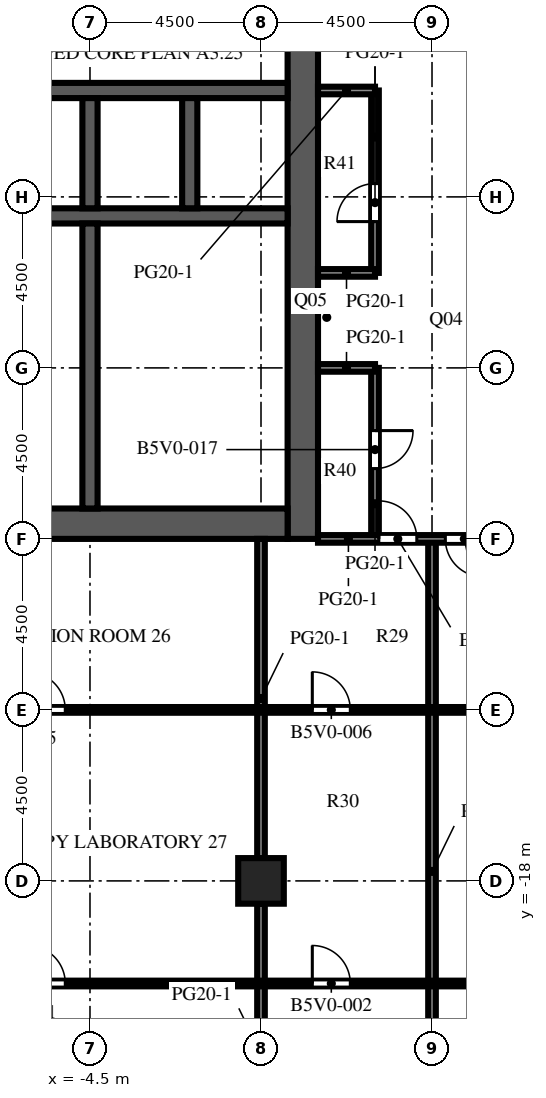
"""IFC4 building model, lengths in metres.
Left out: names, types, materials, properties, quantities, classifications, styles, units other than length and angle.
Written with IfcOpenShell. Run it as: python <this file> out.ifc"""

import sys

from ifc_helpers import new_model, si_unit, direction, frame, frame_2d, origin, origin_2d, place, context, subcontext, project, spatial, rectangle, extrude, element, fill, save


model = new_model("IFC4")
c1 = context("Model", 3, precision=1e-05, world=origin(), true_north=direction((0.0, 1.0)))
c2 = subcontext(c1, "Body", "Model", "MODEL_VIEW")
j1 = project(units=[si_unit("LENGTHUNIT", "METRE"), si_unit("PLANEANGLEUNIT", "RADIAN")], contexts=[c1])
p1 = place(None, origin())
s1 = spatial("IfcSite", under=j1, at=p1, CompositionType="ELEMENT")
p2 = place(p1, origin())
s2 = spatial("IfcBuilding", under=s1, at=p2, CompositionType="ELEMENT")
p3 = place(p2, frame((0.0, 0.0, 160.9)))
s3 = spatial("IfcBuildingStorey", under=s2, at=p3, CompositionType="ELEMENT", Elevation=160.9)
p4 = place(p3, frame((0.0, -18.0, 0.0), z_axis=(0.0, 0.0, 1.0), x_axis=(1.0, 0.0, 0.0)))
e1 = element("IfcColumn", 1, at=p4, inside=s3, PredefinedType="COLUMN", context=c2, shape_type="SweptSolid", body=[
    extrude(rectangle(XDim=1.2, YDim=1.2, at=origin_2d()), origin(), (0.0, 0.0, 1.0), 4.1),
])
p5 = place(p3, frame((1.1, -9.0, 0.0), z_axis=(0.0, 0.0, 1.0), x_axis=(0.0, 1.0, 0.0)))
e2 = element("IfcWall", 2, at=p5, inside=s3, PredefinedType="SHEAR", context=c2, shape_type="SweptSolid", body=[
    extrude(rectangle(XDim=27.5, YDim=0.8, at=frame_2d((13.75, 0.0))), origin(), (0.0, 0.0, 1.0), 4.1),
])
p6 = place(p5, frame((12.55, 0.0, 0.0)))
e3 = element("IfcOpeningElement", 3, at=p6, cuts=e2, PredefinedType="OPENING", context=c2, shape_type="SweptSolid", body=[
    extrude(rectangle(XDim=2.4, YDim=2.4, at=frame_2d((1.2, 1.2))), frame((0.0, 0.41, 0.0), z_axis=(0.0, -1.0, 0.0), x_axis=(1.0, 0.0, 0.0)), (0.0, 0.0, 1.0), 0.82),
])
p7 = place(p5, frame((5.45, 0.0, 0.0)))
e4 = element("IfcOpeningElement", 4, at=p7, cuts=e2, PredefinedType="OPENING", context=c2, shape_type="SweptSolid", body=[
    extrude(rectangle(XDim=1.2, YDim=2.1, at=frame_2d((0.6, 1.05))), frame((0.0, 0.41, 0.0), z_axis=(0.0, -1.0, 0.0), x_axis=(1.0, 0.0, 0.0)), (0.0, 0.0, 1.0), 0.82),
])
p8 = place(p5, frame((19.45, 0.0, 0.0)))
e5 = element("IfcOpeningElement", 5, at=p8, cuts=e2, PredefinedType="OPENING", context=c2, shape_type="SweptSolid", body=[
    extrude(rectangle(XDim=1.0, YDim=2.1, at=frame_2d((0.5, 1.05))), frame((0.0, 0.41, 0.0), z_axis=(0.0, -1.0, 0.0), x_axis=(1.0, 0.0, 0.0)), (0.0, 0.0, 1.0), 0.82),
])
p9 = place(p5, frame((21.137, 0.0, 0.0)))
e6 = element("IfcOpeningElement", 6, at=p9, cuts=e2, PredefinedType="OPENING", context=c2, shape_type="SweptSolid", body=[
    extrude(rectangle(XDim=1.0, YDim=2.1, at=frame_2d((0.5, 1.05))), frame((0.0, 0.41, 0.0), z_axis=(0.0, -1.0, 0.0), x_axis=(1.0, 0.0, 0.0)), (0.0, 0.0, 1.0), 0.82),
])
p10 = place(p5, frame((23.2, 0.0, 0.0)))
e7 = element("IfcOpeningElement", 7, at=p10, cuts=e2, PredefinedType="OPENING", context=c2, shape_type="SweptSolid", body=[
    extrude(rectangle(XDim=1.0, YDim=2.1, at=frame_2d((0.5, 1.05))), frame((0.0, 0.41, 0.0), z_axis=(0.0, -1.0, 0.0), x_axis=(1.0, 0.0, 0.0)), (0.0, 0.0, 1.0), 0.82),
])
p11 = place(p5, frame((25.262, 0.0, 0.0)))
e8 = element("IfcOpeningElement", 8, at=p11, cuts=e2, PredefinedType="OPENING", context=c2, shape_type="SweptSolid", body=[
    extrude(rectangle(XDim=1.0, YDim=2.1, at=frame_2d((0.5, 1.05))), frame((0.0, 0.41, 0.0), z_axis=(0.0, -1.0, 0.0), x_axis=(1.0, 0.0, 0.0)), (0.0, 0.0, 1.0), 0.82),
])
p12 = place(p3, frame((-9.7, -8.6, 0.0), z_axis=(0.0, 0.0, 1.0), x_axis=(1.0, 0.0, 0.0)))
e9 = element("IfcWall", 9, at=p12, inside=s3, PredefinedType="SHEAR", context=c2, shape_type="SweptSolid", body=[
    extrude(rectangle(XDim=10.4, YDim=0.8, at=frame_2d((5.2, 0.0))), origin(), (0.0, 0.0, 1.0), 4.1),
])
p13 = place(p3, frame((-9.7, -0.5, 0.0), z_axis=(0.0, 0.0, 1.0), x_axis=(1.0, 0.0, 0.0)))
e10 = element("IfcWall", 10, at=p13, inside=s3, PredefinedType="SHEAR", context=c2, shape_type="SweptSolid", body=[
    extrude(rectangle(XDim=10.4, YDim=0.4, at=frame_2d((5.2, 0.0))), origin(), (0.0, 0.0, 1.0), 4.1),
])
p14 = place(p3, frame((-9.7, 2.8, 0.0), z_axis=(0.0, 0.0, 1.0), x_axis=(1.0, 0.0, 0.0)))
e11 = element("IfcWall", 11, at=p14, inside=s3, PredefinedType="SHEAR", context=c2, shape_type="SweptSolid", body=[
    extrude(rectangle(XDim=10.4, YDim=0.4, at=frame_2d((5.2, 0.0))), origin(), (0.0, 0.0, 1.0), 4.1),
])
p15 = place(p14, frame((0.738, 0.0, 0.0)))
e12 = element("IfcOpeningElement", 12, at=p15, cuts=e11, PredefinedType="OPENING", context=c2, shape_type="SweptSolid", body=[
    extrude(rectangle(XDim=1.1, YDim=2.1, at=frame_2d((0.55, 1.05))), frame((0.0, 0.21, 0.0), z_axis=(0.0, -1.0, 0.0), x_axis=(1.0, 0.0, 0.0)), (0.0, 0.0, 1.0), 0.42),
])
p16 = place(p14, frame((3.337, 0.0, 0.0)))
e13 = element("IfcOpeningElement", 13, at=p16, cuts=e11, PredefinedType="OPENING", context=c2, shape_type="SweptSolid", body=[
    extrude(rectangle(XDim=1.1, YDim=2.1, at=frame_2d((0.55, 1.05))), frame((0.0, 0.21, 0.0), z_axis=(0.0, -1.0, 0.0), x_axis=(1.0, 0.0, 0.0)), (0.0, 0.0, 1.0), 0.42),
])
p17 = place(p14, frame((6.012, 0.0, 0.0)))
e14 = element("IfcOpeningElement", 14, at=p17, cuts=e11, PredefinedType="OPENING", context=c2, shape_type="SweptSolid", body=[
    extrude(rectangle(XDim=1.0, YDim=2.1, at=frame_2d((0.5, 1.05))), frame((0.0, 0.21, 0.0), z_axis=(0.0, -1.0, 0.0), x_axis=(1.0, 0.0, 0.0)), (0.0, 0.0, 1.0), 0.42),
])
p18 = place(p14, frame((8.613, 0.0, 0.0)))
e15 = element("IfcOpeningElement", 15, at=p18, cuts=e11, PredefinedType="OPENING", context=c2, shape_type="SweptSolid", body=[
    extrude(rectangle(XDim=1.0, YDim=2.1, at=frame_2d((0.5, 1.05))), frame((0.0, 0.21, 0.0), z_axis=(0.0, -1.0, 0.0), x_axis=(1.0, 0.0, 0.0)), (0.0, 0.0, 1.0), 0.42),
])
for number, where, z_axis, x_axis in (
    (16, (-4.5, -0.3, 0.0), (0.0, 0.0, 1.0), (0.0, 1.0, 0.0)),
    (17, (-1.875, -0.3, 0.0), (0.0, 0.0, 1.0), (0.0, 1.0, 0.0)),
):
    element("IfcWall", number, at=place(p3, frame(where, z_axis=z_axis, x_axis=x_axis)), inside=s3, PredefinedType="SHEAR", context=c2, shape_type="SweptSolid", body=[
        extrude(rectangle(XDim=2.9, YDim=0.4, at=frame_2d((1.45, 0.0))), origin(), (0.0, 0.0, 1.0), 4.1),
    ])
p19 = place(p3, frame((-4.5, -8.2, 0.0), z_axis=(0.0, 0.0, 1.0), x_axis=(0.0, 1.0, 0.0)))
e18 = element("IfcWall", 18, at=p19, inside=s3, PredefinedType="SHEAR", context=c2, shape_type="SweptSolid", body=[
    extrude(rectangle(XDim=7.5, YDim=0.4, at=frame_2d((3.75, 0.0))), origin(), (0.0, 0.0, 1.0), 4.1),
])
p20 = place(p3, frame((-0.8, -5.2, 0.0), z_axis=(0.0, 0.0, 1.0), x_axis=(1.0, 0.0, 0.0)))
e19 = element("IfcWall", 19, at=p20, inside=s3, PredefinedType="PARTITIONING", context=c2, shape_type="SweptSolid", body=[
    extrude(rectangle(XDim=1.5, YDim=0.1, at=frame_2d((0.75, 0.0))), origin(), (0.0, 0.0, 1.0), 3.65),
])
p21 = place(p20, frame((0.25, 0.0, 0.0)))
e20 = element("IfcOpeningElement", 20, at=p21, cuts=e19, PredefinedType="OPENING", context=c2, shape_type="SweptSolid", body=[
    extrude(rectangle(XDim=1.0, YDim=2.1, at=frame_2d((0.5, 1.05))), frame((0.0, 0.06, 0.0), z_axis=(0.0, -1.0, 0.0), x_axis=(1.0, 0.0, 0.0)), (0.0, 0.0, 1.0), 0.12),
])
p22 = place(p3, frame((-0.8, -5.2, 0.0), z_axis=(0.0, 0.0, 1.0), x_axis=(0.0, 1.0, 0.0)))
e21 = element("IfcWall", 21, at=p22, inside=s3, PredefinedType="PARTITIONING", context=c2, shape_type="SweptSolid", body=[
    extrude(rectangle(XDim=2.25, YDim=0.1, at=frame_2d((1.125, 0.0))), origin(), (0.0, 0.0, 1.0), 3.65),
])
p23 = place(p22, frame((0.625, 0.0, 0.0)))
e22 = element("IfcOpeningElement", 22, at=p23, cuts=e21, PredefinedType="OPENING", context=c2, shape_type="SweptSolid", body=[
    extrude(rectangle(XDim=1.0, YDim=2.1, at=frame_2d((0.5, 1.05))), frame((0.0, 0.06, 0.0), z_axis=(0.0, -1.0, 0.0), x_axis=(1.0, 0.0, 0.0)), (0.0, 0.0, 1.0), 0.12),
])
p24 = place(p3, frame((-0.8, -2.95, 0.0), z_axis=(0.0, 0.0, 1.0), x_axis=(0.0, 1.0, 0.0)))
e23 = element("IfcWall", 23, at=p24, inside=s3, PredefinedType="PARTITIONING", context=c2, shape_type="SweptSolid", body=[
    extrude(rectangle(XDim=2.25, YDim=0.1, at=frame_2d((1.125, 0.0))), origin(), (0.0, 0.0, 1.0), 3.65),
])
p25 = place(p24, frame((0.625, 0.0, 0.0)))
e24 = element("IfcOpeningElement", 24, at=p25, cuts=e23, PredefinedType="OPENING", context=c2, shape_type="SweptSolid", body=[
    extrude(rectangle(XDim=1.0, YDim=2.1, at=frame_2d((0.5, 1.05))), frame((0.0, 0.06, 0.0), z_axis=(0.0, -1.0, 0.0), x_axis=(1.0, 0.0, 0.0)), (0.0, 0.0, 1.0), 0.12),
])
for number, where, z_axis, x_axis in (
    (25, (-4.3, -5.2, 0.0), (0.0, 0.0, 1.0), (1.0, 0.0, 0.0)),
    (26, (-4.3, -2.95, 0.0), (0.0, 0.0, 1.0), (1.0, 0.0, 0.0)),
):
    element("IfcWall", number, at=place(p3, frame(where, z_axis=z_axis, x_axis=x_axis)), inside=s3, PredefinedType="PARTITIONING", context=c2, shape_type="SweptSolid", body=[
        extrude(rectangle(XDim=3.5, YDim=0.1, at=frame_2d((1.75, 0.0))), origin(), (0.0, 0.0, 1.0), 3.65),
    ])
p26 = place(p3, frame((0.0, -26.5, 0.0), z_axis=(0.0, 0.0, 1.0), x_axis=(0.0, 1.0, 0.0)))
e27 = element("IfcWall", 27, at=p26, inside=s3, PredefinedType="PARTITIONING", context=c2, shape_type="SweptSolid", body=[
    extrude(rectangle(XDim=7.9, YDim=0.2, at=frame_2d((3.95, 0.0))), origin(), (0.0, 0.0, 1.0), 3.65),
])
p27 = place(p3, frame((0.0, -17.4, 0.0), z_axis=(0.0, 0.0, 1.0), x_axis=(0.0, 1.0, 0.0)))
e28 = element("IfcWall", 28, at=p27, inside=s3, PredefinedType="PARTITIONING", context=c2, shape_type="SweptSolid", body=[
    extrude(rectangle(XDim=8.4, YDim=0.2, at=frame_2d((4.2, 0.0))), origin(), (0.0, 0.0, 1.0), 3.65),
])
p28 = place(p3, frame((3.0, -9.0, 0.0), z_axis=(0.0, 0.0, 1.0), x_axis=(0.0, 1.0, 0.0)))
e29 = element("IfcWall", 29, at=p28, inside=s3, PredefinedType="PARTITIONING", context=c2, shape_type="SweptSolid", body=[
    extrude(rectangle(XDim=4.5, YDim=0.2, at=frame_2d((2.25, 0.0))), origin(), (0.0, 0.0, 1.0), 3.65),
])
p29 = place(p28, frame((1.85, 0.0, 0.0)))
e30 = element("IfcOpeningElement", 30, at=p29, cuts=e29, PredefinedType="OPENING", context=c2, shape_type="SweptSolid", body=[
    extrude(rectangle(XDim=1.0, YDim=2.1, at=frame_2d((0.5, 1.05))), frame((0.0, 0.11, 0.0), z_axis=(0.0, -1.0, 0.0), x_axis=(1.0, 0.0, 0.0)), (0.0, 0.0, 1.0), 0.22),
])
p30 = place(p3, frame((3.0, -2.0, 0.0), z_axis=(0.0, 0.0, 1.0), x_axis=(0.0, 1.0, 0.0)))
e31 = element("IfcWall", 31, at=p30, inside=s3, PredefinedType="PARTITIONING", context=c2, shape_type="SweptSolid", body=[
    extrude(rectangle(XDim=4.8, YDim=0.2, at=frame_2d((2.4, 0.0))), origin(), (0.0, 0.0, 1.0), 3.65),
])
p31 = place(p30, frame((1.35, 0.0, 0.0)))
e32 = element("IfcOpeningElement", 32, at=p31, cuts=e31, PredefinedType="OPENING", context=c2, shape_type="SweptSolid", body=[
    extrude(rectangle(XDim=1.0, YDim=2.1, at=frame_2d((0.5, 1.05))), frame((0.0, 0.11, 0.0), z_axis=(0.0, -1.0, 0.0), x_axis=(1.0, 0.0, 0.0)), (0.0, 0.0, 1.0), 0.22),
])
p32 = place(p3, frame((4.5, -26.5, 0.0), z_axis=(0.0, 0.0, 1.0), x_axis=(0.0, 1.0, 0.0)))
e33 = element("IfcWall", 33, at=p32, inside=s3, PredefinedType="PARTITIONING", context=c2, shape_type="SweptSolid", body=[
    extrude(rectangle(XDim=17.5, YDim=0.2, at=frame_2d((8.75, 0.0))), origin(), (0.0, 0.0, 1.0), 3.65),
])
p33 = place(p3, frame((21.0, -20.7, 0.0), z_axis=(0.0, 0.0, 1.0), x_axis=(-1.0, 0.0, 0.0)))
e34 = element("IfcWall", 34, at=p33, inside=s3, PredefinedType="PARTITIONING", context=c2, shape_type="SweptSolid", body=[
    extrude(rectangle(XDim=34.5, YDim=0.15, at=frame_2d((17.25, 0.0))), origin(), (0.0, 0.0, 1.0), 3.65),
])
p34 = place(p33, frame((26.15, 0.0, 0.0)))
e35 = element("IfcOpeningElement", 35, at=p34, cuts=e34, PredefinedType="OPENING", context=c2, shape_type="SweptSolid", body=[
    extrude(rectangle(XDim=1.0, YDim=2.1, at=frame_2d((0.5, 1.05))), frame((0.0, 0.085, 0.0), z_axis=(0.0, -1.0, 0.0), x_axis=(1.0, 0.0, 0.0)), (0.0, 0.0, 1.0), 0.17),
])
p35 = place(p33, frame((18.65, 0.0, 0.0)))
e36 = element("IfcOpeningElement", 36, at=p35, cuts=e34, PredefinedType="OPENING", context=c2, shape_type="SweptSolid", body=[
    extrude(rectangle(XDim=1.0, YDim=2.1, at=frame_2d((0.5, 1.05))), frame((0.0, 0.085, 0.0), z_axis=(0.0, -1.0, 0.0), x_axis=(1.0, 0.0, 0.0)), (0.0, 0.0, 1.0), 0.17),
])
p36 = place(p33, frame((10.65, 0.0, 0.0)))
e37 = element("IfcOpeningElement", 37, at=p36, cuts=e34, PredefinedType="OPENING", context=c2, shape_type="SweptSolid", body=[
    extrude(rectangle(XDim=1.0, YDim=2.1, at=frame_2d((0.5, 1.05))), frame((0.0, 0.085, 0.0), z_axis=(0.0, -1.0, 0.0), x_axis=(1.0, 0.0, 0.0)), (0.0, 0.0, 1.0), 0.17),
])
p37 = place(p33, frame((4.15, 0.0, 0.0)))
e38 = element("IfcOpeningElement", 38, at=p37, cuts=e34, PredefinedType="OPENING", context=c2, shape_type="SweptSolid", body=[
    extrude(rectangle(XDim=1.0, YDim=2.1, at=frame_2d((0.5, 1.05))), frame((0.0, 0.085, 0.0), z_axis=(0.0, -1.0, 0.0), x_axis=(1.0, 0.0, 0.0)), (0.0, 0.0, 1.0), 0.17),
])
p38 = place(p3, frame((21.0, -13.5, 0.0), z_axis=(0.0, 0.0, 1.0), x_axis=(-1.0, 0.0, 0.0)))
e39 = element("IfcWall", 39, at=p38, inside=s3, PredefinedType="PARTITIONING", context=c2, shape_type="SweptSolid", body=[
    extrude(rectangle(XDim=34.5, YDim=0.15, at=frame_2d((17.25, 0.0))), origin(), (0.0, 0.0, 1.0), 3.65),
])
p39 = place(p38, frame((26.15, 0.0, 0.0)))
e40 = element("IfcOpeningElement", 40, at=p39, cuts=e39, PredefinedType="OPENING", context=c2, shape_type="SweptSolid", body=[
    extrude(rectangle(XDim=1.0, YDim=2.1, at=frame_2d((0.5, 1.05))), frame((0.0, 0.085, 0.0), z_axis=(0.0, -1.0, 0.0), x_axis=(1.0, 0.0, 0.0)), (0.0, 0.0, 1.0), 0.17),
])
p40 = place(p38, frame((18.65, 0.0, 0.0)))
e41 = element("IfcOpeningElement", 41, at=p40, cuts=e39, PredefinedType="OPENING", context=c2, shape_type="SweptSolid", body=[
    extrude(rectangle(XDim=1.0, YDim=2.1, at=frame_2d((0.5, 1.05))), frame((0.0, 0.085, 0.0), z_axis=(0.0, -1.0, 0.0), x_axis=(1.0, 0.0, 0.0)), (0.0, 0.0, 1.0), 0.17),
])
p41 = place(p38, frame((11.4, 0.0, 0.0)))
e42 = element("IfcOpeningElement", 42, at=p41, cuts=e39, PredefinedType="OPENING", context=c2, shape_type="SweptSolid", body=[
    extrude(rectangle(XDim=1.0, YDim=2.1, at=frame_2d((0.5, 1.05))), frame((0.0, 0.085, 0.0), z_axis=(0.0, -1.0, 0.0), x_axis=(1.0, 0.0, 0.0)), (0.0, 0.0, 1.0), 0.17),
])
p42 = place(p38, frame((3.15, 0.0, 0.0)))
e43 = element("IfcOpeningElement", 43, at=p42, cuts=e39, PredefinedType="OPENING", context=c2, shape_type="SweptSolid", body=[
    extrude(rectangle(XDim=1.0, YDim=2.1, at=frame_2d((0.5, 1.05))), frame((0.0, 0.085, 0.0), z_axis=(0.0, -1.0, 0.0), x_axis=(1.0, 0.0, 0.0)), (0.0, 0.0, 1.0), 0.17),
])
p43 = place(p3, frame((6.0, -9.0, 0.0), z_axis=(0.0, 0.0, 1.0), x_axis=(-1.0, 0.0, 0.0)))
e44 = element("IfcWall", 44, at=p43, inside=s3, PredefinedType="PARTITIONING", context=c2, shape_type="SweptSolid", body=[
    extrude(rectangle(XDim=4.5, YDim=0.2, at=frame_2d((2.25, 0.0))), origin(), (0.0, 0.0, 1.0), 3.65),
])
p44 = place(p43, frame((1.9, 0.0, 0.0)))
e45 = element("IfcOpeningElement", 45, at=p44, cuts=e44, PredefinedType="OPENING", context=c2, shape_type="SweptSolid", body=[
    extrude(rectangle(XDim=1.0, YDim=2.1, at=frame_2d((0.5, 1.05))), frame((0.0, 0.11, 0.0), z_axis=(0.0, -1.0, 0.0), x_axis=(1.0, 0.0, 0.0)), (0.0, 0.0, 1.0), 0.22),
])
p45 = place(p43, frame((0.15, 0.0, 0.0)))
e46 = element("IfcOpeningElement", 46, at=p45, cuts=e44, PredefinedType="OPENING", context=c2, shape_type="SweptSolid", body=[
    extrude(rectangle(XDim=1.0, YDim=2.1, at=frame_2d((0.5, 1.05))), frame((0.0, 0.11, 0.0), z_axis=(0.0, -1.0, 0.0), x_axis=(1.0, 0.0, 0.0)), (0.0, 0.0, 1.0), 0.22),
])
for number, where, z_axis, x_axis in (
    (47, (1.5, -4.5, 0.0), (0.0, 0.0, 1.0), (1.0, 0.0, 0.0)),
    (48, (1.5, -2.0, 0.0), (0.0, 0.0, 1.0), (1.0, 0.0, 0.0)),
    (49, (1.5, 2.8, 0.0), (0.0, 0.0, 1.0), (1.0, 0.0, 0.0)),
):
    element("IfcWall", number, at=place(p3, frame(where, z_axis=z_axis, x_axis=x_axis)), inside=s3, PredefinedType="PARTITIONING", context=c2, shape_type="SweptSolid", body=[
        extrude(rectangle(XDim=1.5, YDim=0.2, at=frame_2d((0.75, 0.0))), origin(), (0.0, 0.0, 1.0), 3.65),
    ])
p46 = place(p16, origin())
e50 = element("IfcDoor", 50, at=p46, inside=s3, OperationType="DOUBLE_DOOR_SLIDING", PredefinedType="DOOR", context=c2, shape_type="SweptSolid", body=[
    extrude(rectangle(XDim=1.1, YDim=2.1, at=frame_2d((0.55, 1.05))), frame((0.0, 0.025, 0.0), z_axis=(0.0, -1.0, 0.0), x_axis=(1.0, 0.0, 0.0)), (0.0, 0.0, 1.0), 0.05),
])
fill(e13, e50)
p47 = place(p6, origin())
e51 = element("IfcDoor", 51, at=p47, inside=s3, OperationType="DOUBLE_DOOR_DOUBLE_SWING", PredefinedType="DOOR", context=c2, shape_type="SweptSolid", body=[
    extrude(rectangle(XDim=2.4, YDim=2.4, at=frame_2d((1.2, 1.2))), frame((0.0, 0.025, 0.0), z_axis=(0.0, -1.0, 0.0), x_axis=(1.0, 0.0, 0.0)), (0.0, 0.0, 1.0), 0.05),
])
fill(e3, e51)
p48 = place(p17, origin())
e52 = element("IfcDoor", 52, at=p48, inside=s3, OperationType="SINGLE_SWING_LEFT", PredefinedType="DOOR", context=c2, shape_type="SweptSolid", body=[
    extrude(rectangle(XDim=1.0, YDim=2.1, at=frame_2d((0.5, 1.05))), frame((0.0, 0.025, 0.0), z_axis=(0.0, -1.0, 0.0), x_axis=(1.0, 0.0, 0.0)), (0.0, 0.0, 1.0), 0.05),
])
fill(e14, e52)
p49 = place(p18, origin())
e53 = element("IfcDoor", 53, at=p49, inside=s3, OperationType="SINGLE_SWING_RIGHT", PredefinedType="DOOR", context=c2, shape_type="SweptSolid", body=[
    extrude(rectangle(XDim=1.0, YDim=2.1, at=frame_2d((0.5, 1.05))), frame((0.0, 0.025, 0.0), z_axis=(0.0, -1.0, 0.0), x_axis=(1.0, 0.0, 0.0)), (0.0, 0.0, 1.0), 0.05),
])
fill(e15, e53)
p50 = place(p7, origin())
e54 = element("IfcDoor", 54, at=p50, inside=s3, OperationType="SINGLE_SWING_LEFT", PredefinedType="DOOR", context=c2, shape_type="SweptSolid", body=[
    extrude(rectangle(XDim=1.2, YDim=2.1, at=frame_2d((0.6, 1.05))), frame((0.0, 0.375, 0.0), z_axis=(0.0, -1.0, 0.0), x_axis=(1.0, 0.0, 0.0)), (0.0, 0.0, 1.0), 0.05),
])
fill(e4, e54)
p51 = place(p21, origin())
e55 = element("IfcDoor", 55, at=p51, inside=s3, OperationType="SINGLE_SWING_RIGHT", PredefinedType="DOOR", context=c2, shape_type="SweptSolid", body=[
    extrude(rectangle(XDim=1.0, YDim=2.1, at=frame_2d((0.5, 1.05))), frame((0.0, 0.025, 0.0), z_axis=(0.0, -1.0, 0.0), x_axis=(1.0, 0.0, 0.0)), (0.0, 0.0, 1.0), 0.05),
])
fill(e20, e55)
p52 = place(p23, origin())
e56 = element("IfcDoor", 56, at=p52, inside=s3, OperationType="SINGLE_SWING_LEFT", PredefinedType="DOOR", context=c2, shape_type="SweptSolid", body=[
    extrude(rectangle(XDim=1.0, YDim=2.1, at=frame_2d((0.5, 1.05))), frame((0.0, 0.025, 0.0), z_axis=(0.0, -1.0, 0.0), x_axis=(1.0, 0.0, 0.0)), (0.0, 0.0, 1.0), 0.05),
])
fill(e22, e56)
p53 = place(p25, origin())
e57 = element("IfcDoor", 57, at=p53, inside=s3, OperationType="SINGLE_SWING_RIGHT", PredefinedType="DOOR", context=c2, shape_type="SweptSolid", body=[
    extrude(rectangle(XDim=1.0, YDim=2.1, at=frame_2d((0.5, 1.05))), frame((0.0, 0.025, 0.0), z_axis=(0.0, -1.0, 0.0), x_axis=(1.0, 0.0, 0.0)), (0.0, 0.0, 1.0), 0.05),
])
fill(e24, e57)
p54 = place(p34, origin())
e58 = element("IfcDoor", 58, at=p54, inside=s3, OperationType="SINGLE_SWING_RIGHT", PredefinedType="DOOR", context=c2, shape_type="SweptSolid", body=[
    extrude(rectangle(XDim=1.0, YDim=2.1, at=frame_2d((0.5, 1.05))), frame((0.0, 0.025, 0.0), z_axis=(0.0, -1.0, 0.0), x_axis=(1.0, 0.0, 0.0)), (0.0, 0.0, 1.0), 0.05),
])
fill(e35, e58)
p55 = place(p35, origin())
e59 = element("IfcDoor", 59, at=p55, inside=s3, OperationType="SINGLE_SWING_RIGHT", PredefinedType="DOOR", context=c2, shape_type="SweptSolid", body=[
    extrude(rectangle(XDim=1.0, YDim=2.1, at=frame_2d((0.5, 1.05))), frame((0.0, 0.025, 0.0), z_axis=(0.0, -1.0, 0.0), x_axis=(1.0, 0.0, 0.0)), (0.0, 0.0, 1.0), 0.05),
])
fill(e36, e59)
p56 = place(p39, origin())
e60 = element("IfcDoor", 60, at=p56, inside=s3, OperationType="SINGLE_SWING_RIGHT", PredefinedType="DOOR", context=c2, shape_type="SweptSolid", body=[
    extrude(rectangle(XDim=1.0, YDim=2.1, at=frame_2d((0.5, 1.05))), frame((0.0, 0.025, 0.0), z_axis=(0.0, -1.0, 0.0), x_axis=(1.0, 0.0, 0.0)), (0.0, 0.0, 1.0), 0.05),
])
fill(e40, e60)
p57 = place(p40, origin())
e61 = element("IfcDoor", 61, at=p57, inside=s3, OperationType="SINGLE_SWING_RIGHT", PredefinedType="DOOR", context=c2, shape_type="SweptSolid", body=[
    extrude(rectangle(XDim=1.0, YDim=2.1, at=frame_2d((0.5, 1.05))), frame((0.0, 0.025, 0.0), z_axis=(0.0, -1.0, 0.0), x_axis=(1.0, 0.0, 0.0)), (0.0, 0.0, 1.0), 0.05),
])
fill(e41, e61)
p58 = place(p44, origin())
e62 = element("IfcDoor", 62, at=p58, inside=s3, OperationType="SINGLE_SWING_RIGHT", PredefinedType="DOOR", context=c2, shape_type="SweptSolid", body=[
    extrude(rectangle(XDim=1.0, YDim=2.1, at=frame_2d((0.5, 1.05))), frame((0.0, 0.025, 0.0), z_axis=(0.0, -1.0, 0.0), x_axis=(1.0, 0.0, 0.0)), (0.0, 0.0, 1.0), 0.05),
])
fill(e45, e62)
p59 = place(p45, origin())
e63 = element("IfcDoor", 63, at=p59, inside=s3, OperationType="SINGLE_SWING_LEFT", PredefinedType="DOOR", context=c2, shape_type="SweptSolid", body=[
    extrude(rectangle(XDim=1.0, YDim=2.1, at=frame_2d((0.5, 1.05))), frame((0.0, 0.025, 0.0), z_axis=(0.0, -1.0, 0.0), x_axis=(1.0, 0.0, 0.0)), (0.0, 0.0, 1.0), 0.05),
])
fill(e46, e63)
p60 = place(p29, origin())
e64 = element("IfcDoor", 64, at=p60, inside=s3, OperationType="SINGLE_SWING_RIGHT", PredefinedType="DOOR", context=c2, shape_type="SweptSolid", body=[
    extrude(rectangle(XDim=1.0, YDim=2.1, at=frame_2d((0.5, 1.05))), frame((0.0, 0.025, 0.0), z_axis=(0.0, -1.0, 0.0), x_axis=(1.0, 0.0, 0.0)), (0.0, 0.0, 1.0), 0.05),
])
fill(e30, e64)
p61 = place(p31, origin())
e65 = element("IfcDoor", 65, at=p61, inside=s3, OperationType="SINGLE_SWING_LEFT", PredefinedType="DOOR", context=c2, shape_type="SweptSolid", body=[
    extrude(rectangle(XDim=1.0, YDim=2.1, at=frame_2d((0.5, 1.05))), frame((0.0, 0.025, 0.0), z_axis=(0.0, -1.0, 0.0), x_axis=(1.0, 0.0, 0.0)), (0.0, 0.0, 1.0), 0.05),
])
fill(e32, e65)
save(model, sys.argv[1])
